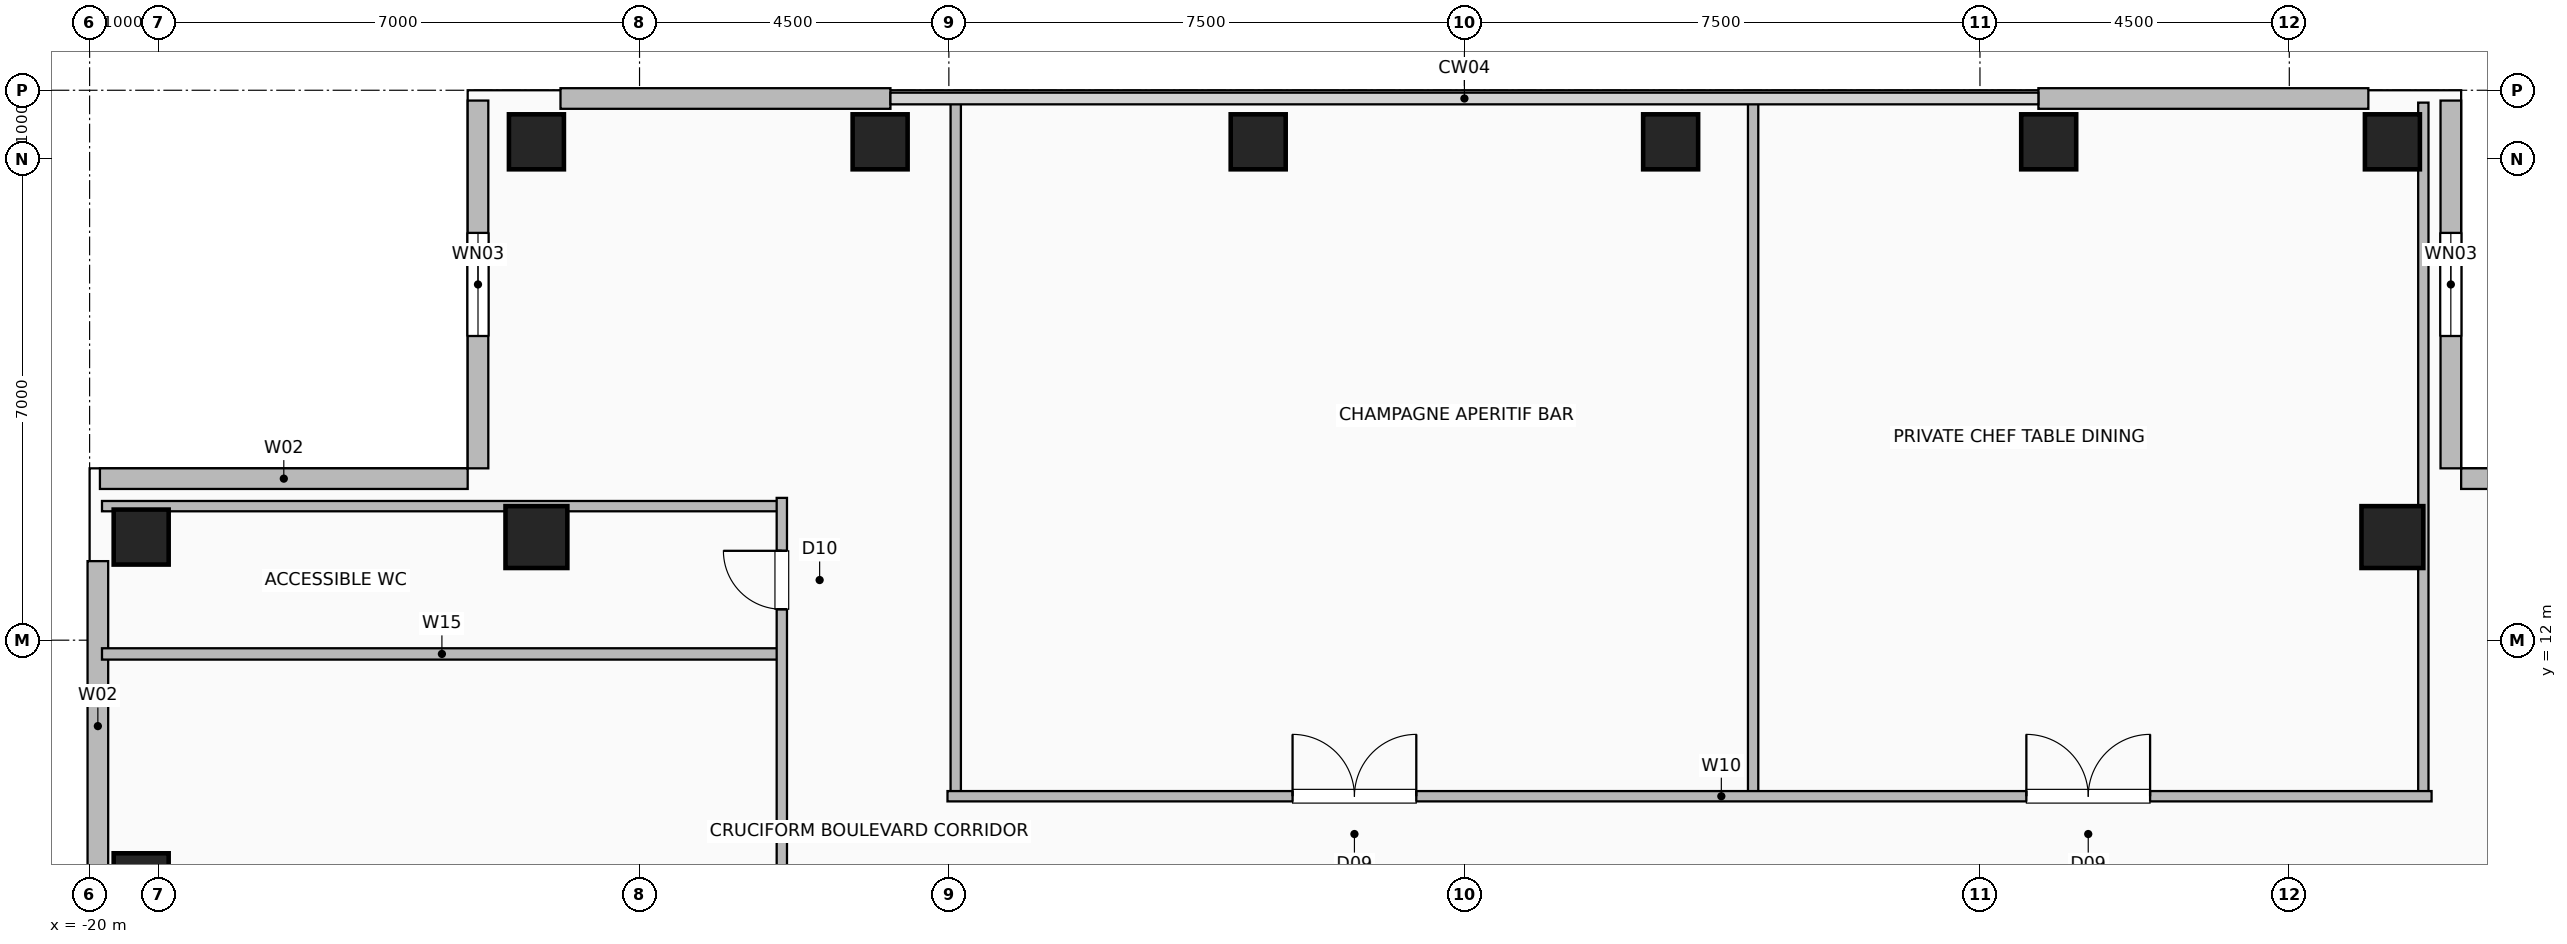
"""IFC4 building model, lengths in metres.
Left out: names, types, materials, properties, quantities, classifications, styles, units other than length and angle.
Written with IfcOpenShell. Run it as: python <this file> out.ifc"""

import sys

from ifc_helpers import new_model, si_unit, direction, frame, frame_2d, origin, origin_2d, place, context, subcontext, project, spatial, rectangle, hollow_rectangle, extrude, element, fill, save


model = new_model("IFC4")
c1 = context("Model", 3, precision=1e-05, world=origin(), true_north=direction((0.0, 1.0)))
c2 = subcontext(c1, "Body", "Model", "MODEL_VIEW")
j1 = project(units=[si_unit("LENGTHUNIT", "METRE"), si_unit("PLANEANGLEUNIT", "RADIAN")], contexts=[c1])
p1 = place(None, origin())
s1 = spatial("IfcSite", under=j1, at=p1, CompositionType="ELEMENT")
p2 = place(p1, origin())
s2 = spatial("IfcBuilding", under=s1, at=p2, CompositionType="ELEMENT")
p3 = place(p2, frame((0.0, 0.0, 191.4)))
s3 = spatial("IfcBuildingStorey", under=s2, at=p3, CompositionType="ELEMENT", Elevation=191.4)
for number, where, z_axis, x_axis in (
    (1, (-13.5, 19.25, 0.0), (0.0, 0.0, 1.0), (1.0, 0.0, 0.0)),
    (2, (-8.5, 19.25, 0.0), (0.0, 0.0, 1.0), (1.0, 0.0, 0.0)),
    (3, (-3.0, 19.25, 0.0), (0.0, 0.0, 1.0), (1.0, 0.0, 0.0)),
    (4, (3.0, 19.25, 0.0), (0.0, 0.0, 1.0), (1.0, 0.0, 0.0)),
    (5, (8.5, 19.25, 0.0), (0.0, 0.0, 1.0), (1.0, 0.0, 0.0)),
    (6, (-19.25, 8.5, 0.0), (0.0, 0.0, 1.0), (1.0, 0.0, 0.0)),
    (7, (13.5, 19.25, 0.0), (0.0, 0.0, 1.0), (1.0, 0.0, 0.0)),
    (8, (-19.25, 13.5, 0.0), (0.0, 0.0, 1.0), (1.0, 0.0, 0.0)),
):
    element("IfcColumn", number, at=place(p3, frame(where, z_axis=z_axis, x_axis=x_axis)), inside=s3, PredefinedType="COLUMN", context=c2, shape_type="SweptSolid", body=[
        extrude(hollow_rectangle(XDim=0.8, YDim=0.8, WallThickness=0.04, at=origin_2d()), origin(), (0.0, 0.0, 1.0), 3.6),
    ])
for number, where, z_axis, x_axis in (
    (9, (13.5, 13.5, 0.0), (0.0, 0.0, 1.0), (1.0, 0.0, 0.0)),
    (10, (-13.5, 13.5, 0.0), (0.0, 0.0, 1.0), (1.0, 0.0, 0.0)),
):
    element("IfcColumn", number, at=place(p3, frame(where, z_axis=z_axis, x_axis=x_axis)), inside=s3, PredefinedType="COLUMN", context=c2, shape_type="SweptSolid", body=[
        extrude(hollow_rectangle(XDim=0.9, YDim=0.9, WallThickness=0.045, at=origin_2d()), origin(), (0.0, 0.0, 1.0), 3.6),
    ])
for number, where, z_axis, x_axis in (
    (11, (-13.15, 19.88, 0.0), (0.0, 0.0, 1.0), (1.0, 0.0, 0.0)),
    (12, (8.35, 19.88, 0.0), (0.0, 0.0, 1.0), (1.0, 0.0, 0.0)),
    (13, (-19.88, 8.35, 0.0), (0.0, 0.0, 1.0), (0.0, 1.0, 0.0)),
):
    element("IfcWall", number, at=place(p3, frame(where, z_axis=z_axis, x_axis=x_axis)), inside=s3, PredefinedType="SOLIDWALL", context=c2, shape_type="SweptSolid", body=[
        extrude(rectangle(XDim=4.8, YDim=0.3, at=frame_2d((2.4, 0.0))), origin(), (0.0, 0.0, 1.0), 3.36),
    ])
p4 = place(p3, frame((14.35, 19.85, 0.0), z_axis=(0.0, 0.0, 1.0), x_axis=(0.0, -1.0, 0.0)))
e14 = element("IfcWall", 14, at=p4, inside=s3, PredefinedType="SOLIDWALL", context=c2, shape_type="SweptSolid", body=[
    extrude(rectangle(XDim=5.35, YDim=0.3, at=frame_2d((2.675, 0.0))), origin(), (0.0, 0.0, 1.0), 3.36),
])
p5 = place(p4, frame((1.925, 0.0, 0.9)))
e15 = element("IfcOpeningElement", 15, at=p5, cuts=e14, PredefinedType="OPENING", context=c2, shape_type="SweptSolid", body=[
    extrude(rectangle(XDim=1.5, YDim=1.8, at=frame_2d((0.75, 0.9))), frame((0.0, 0.16, 0.0), z_axis=(0.0, -1.0, 0.0), x_axis=(1.0, 0.0, 0.0)), (0.0, 0.0, 1.0), 0.32),
])
p6 = place(p3, frame((19.85, 14.35, 0.0), z_axis=(0.0, 0.0, 1.0), x_axis=(-1.0, 0.0, 0.0)))
e16 = element("IfcWall", 16, at=p6, inside=s3, PredefinedType="SOLIDWALL", context=c2, shape_type="SweptSolid", body=[
    extrude(rectangle(XDim=5.35, YDim=0.3, at=frame_2d((2.675, 0.0))), origin(), (0.0, 0.0, 1.0), 3.36),
])
p7 = place(p3, frame((-14.35, 19.85, 0.0), z_axis=(0.0, 0.0, 1.0), x_axis=(0.0, -1.0, 0.0)))
e17 = element("IfcWall", 17, at=p7, inside=s3, PredefinedType="SOLIDWALL", context=c2, shape_type="SweptSolid", body=[
    extrude(rectangle(XDim=5.35, YDim=0.3, at=frame_2d((2.675, 0.0))), origin(), (0.0, 0.0, 1.0), 3.36),
])
p8 = place(p7, frame((1.925, 0.0, 0.9)))
e18 = element("IfcOpeningElement", 18, at=p8, cuts=e17, PredefinedType="OPENING", context=c2, shape_type="SweptSolid", body=[
    extrude(rectangle(XDim=1.5, YDim=1.8, at=frame_2d((0.75, 0.9))), frame((0.0, 0.16, 0.0), z_axis=(0.0, -1.0, 0.0), x_axis=(1.0, 0.0, 0.0)), (0.0, 0.0, 1.0), 0.32),
])
p9 = place(p3, frame((-19.85, 14.35, 0.0), z_axis=(0.0, 0.0, 1.0), x_axis=(1.0, 0.0, 0.0)))
e19 = element("IfcWall", 19, at=p9, inside=s3, PredefinedType="SOLIDWALL", context=c2, shape_type="SweptSolid", body=[
    extrude(rectangle(XDim=5.35, YDim=0.3, at=frame_2d((2.675, 0.0))), origin(), (0.0, 0.0, 1.0), 3.36),
])
p10 = place(p3, frame((-19.82, 11.8, 0.0), z_axis=(0.0, 0.0, 1.0), x_axis=(1.0, 0.0, 0.0)))
e20 = element("IfcWall", 20, at=p10, inside=s3, PredefinedType="PLUMBINGWALL", context=c2, shape_type="SweptSolid", body=[
    extrude(rectangle(XDim=9.89, YDim=0.165, at=frame_2d((4.945, 0.0))), origin(), (0.0, 0.0, 1.0), 3.36),
])
p11 = place(p3, frame((-19.82, 13.95, 0.0), z_axis=(0.0, 0.0, 1.0), x_axis=(1.0, 0.0, 0.0)))
e21 = element("IfcWall", 21, at=p11, inside=s3, PredefinedType="PARTITIONING", context=c2, shape_type="SweptSolid", body=[
    extrude(rectangle(XDim=9.89, YDim=0.15, at=frame_2d((4.945, 0.0))), origin(), (0.0, 0.0, 1.0), 3.36),
])
p12 = place(p3, frame((-9.93, -7.52, 0.0), z_axis=(0.0, 0.0, 1.0), x_axis=(0.0, 1.0, 0.0)))
e22 = element("IfcWall", 22, at=p12, inside=s3, PredefinedType="PARTITIONING", context=c2, shape_type="SweptSolid", body=[
    extrude(rectangle(XDim=21.59, YDim=0.15, at=frame_2d((10.795, 0.0))), origin(), (0.0, 0.0, 1.0), 3.36),
])
p13 = place(p12, frame((8.82, 0.0, 0.0)))
e23 = element("IfcOpeningElement", 23, at=p13, cuts=e22, PredefinedType="OPENING", context=c2, shape_type="SweptSolid", body=[
    extrude(rectangle(XDim=1.8, YDim=2.08, at=frame_2d((0.9, 1.04))), frame((0.0, 0.085, 0.0), z_axis=(0.0, -1.0, 0.0), x_axis=(1.0, 0.0, 0.0)), (0.0, 0.0, 1.0), 0.17),
])
p14 = place(p12, frame((19.97, 0.0, 0.0)))
e24 = element("IfcOpeningElement", 24, at=p14, cuts=e22, PredefinedType="OPENING", context=c2, shape_type="SweptSolid", body=[
    extrude(rectangle(XDim=0.85, YDim=2.05, at=frame_2d((0.425, 1.025))), frame((0.0, 0.085, 0.0), z_axis=(0.0, -1.0, 0.0), x_axis=(1.0, 0.0, 0.0)), (0.0, 0.0, 1.0), 0.17),
])
for number, where, z_axis, x_axis in (
    (25, (-7.4, 9.73, 0.0), (0.0, 0.0, 1.0), (0.0, 1.0, 0.0)),
    (26, (4.2, 9.73, 0.0), (0.0, 0.0, 1.0), (0.0, 1.0, 0.0)),
    (27, (13.95, 9.73, 0.0), (0.0, 0.0, 1.0), (0.0, 1.0, 0.0)),
):
    element("IfcWall", number, at=place(p3, frame(where, z_axis=z_axis, x_axis=x_axis)), inside=s3, PredefinedType="PARTITIONING", context=c2, shape_type="SweptSolid", body=[
        extrude(rectangle(XDim=10.09, YDim=0.15, at=frame_2d((5.045, 0.0))), origin(), (0.0, 0.0, 1.0), 3.36),
    ])
p15 = place(p3, frame((-7.52, 9.73, 0.0), z_axis=(0.0, 0.0, 1.0), x_axis=(1.0, 0.0, 0.0)))
e28 = element("IfcWall", 28, at=p15, inside=s3, PredefinedType="PARTITIONING", context=c2, shape_type="SweptSolid", body=[
    extrude(rectangle(XDim=21.59, YDim=0.15, at=frame_2d((10.795, 0.0))), origin(), (0.0, 0.0, 1.0), 3.36),
])
p16 = place(p15, frame((5.02, 0.0, 0.0)))
e29 = element("IfcOpeningElement", 29, at=p16, cuts=e28, PredefinedType="OPENING", context=c2, shape_type="SweptSolid", body=[
    extrude(rectangle(XDim=1.8, YDim=2.08, at=frame_2d((0.9, 1.04))), frame((0.0, 0.085, 0.0), z_axis=(0.0, -1.0, 0.0), x_axis=(1.0, 0.0, 0.0)), (0.0, 0.0, 1.0), 0.17),
])
p17 = place(p15, frame((15.695, 0.0, 0.0)))
e30 = element("IfcOpeningElement", 30, at=p17, cuts=e28, PredefinedType="OPENING", context=c2, shape_type="SweptSolid", body=[
    extrude(rectangle(XDim=1.8, YDim=2.08, at=frame_2d((0.9, 1.04))), frame((0.0, 0.085, 0.0), z_axis=(0.0, -1.0, 0.0), x_axis=(1.0, 0.0, 0.0)), (0.0, 0.0, 1.0), 0.17),
])
p18 = place(p5, origin())
e31 = element("IfcWindow", 31, at=p18, inside=s3, PartitioningType="SINGLE_PANEL", PredefinedType="WINDOW", context=c2, shape_type="SweptSolid", body=[
    extrude(rectangle(XDim=1.5, YDim=1.8, at=frame_2d((0.75, 0.9))), frame((0.0, 0.03, 0.0), z_axis=(0.0, -1.0, 0.0), x_axis=(1.0, 0.0, 0.0)), (0.0, 0.0, 1.0), 0.06),
])
fill(e15, e31)
p19 = place(p8, origin())
e32 = element("IfcWindow", 32, at=p19, inside=s3, PartitioningType="SINGLE_PANEL", PredefinedType="WINDOW", context=c2, shape_type="SweptSolid", body=[
    extrude(rectangle(XDim=1.5, YDim=1.8, at=frame_2d((0.75, 0.9))), frame((0.0, 0.03, 0.0), z_axis=(0.0, -1.0, 0.0), x_axis=(1.0, 0.0, 0.0)), (0.0, 0.0, 1.0), 0.06),
])
fill(e18, e32)
p20 = place(p14, origin())
e33 = element("IfcDoor", 33, at=p20, inside=s3, OperationType="SINGLE_SWING_RIGHT", PredefinedType="DOOR", context=c2, shape_type="SweptSolid", body=[
    extrude(rectangle(XDim=0.85, YDim=2.05, at=frame_2d((0.425, 1.025))), frame((0.0, 0.025, 0.0), z_axis=(0.0, -1.0, 0.0), x_axis=(1.0, 0.0, 0.0)), (0.0, 0.0, 1.0), 0.05),
])
fill(e24, e33)
p21 = place(p16, origin())
e34 = element("IfcDoor", 34, at=p21, inside=s3, OperationType="DOUBLE_DOOR_SINGLE_SWING", PredefinedType="DOOR", context=c2, shape_type="SweptSolid", body=[
    extrude(rectangle(XDim=1.8, YDim=2.08, at=frame_2d((0.9, 1.04))), frame((0.0, 0.025, 0.0), z_axis=(0.0, -1.0, 0.0), x_axis=(1.0, 0.0, 0.0)), (0.0, 0.0, 1.0), 0.05),
])
fill(e29, e34)
p22 = place(p17, origin())
e35 = element("IfcDoor", 35, at=p22, inside=s3, OperationType="DOUBLE_DOOR_SINGLE_SWING", PredefinedType="DOOR", context=c2, shape_type="SweptSolid", body=[
    extrude(rectangle(XDim=1.8, YDim=2.08, at=frame_2d((0.9, 1.04))), frame((0.0, 0.025, 0.0), z_axis=(0.0, -1.0, 0.0), x_axis=(1.0, 0.0, 0.0)), (0.0, 0.0, 1.0), 0.05),
])
fill(e30, e35)
save(model, sys.argv[1])
